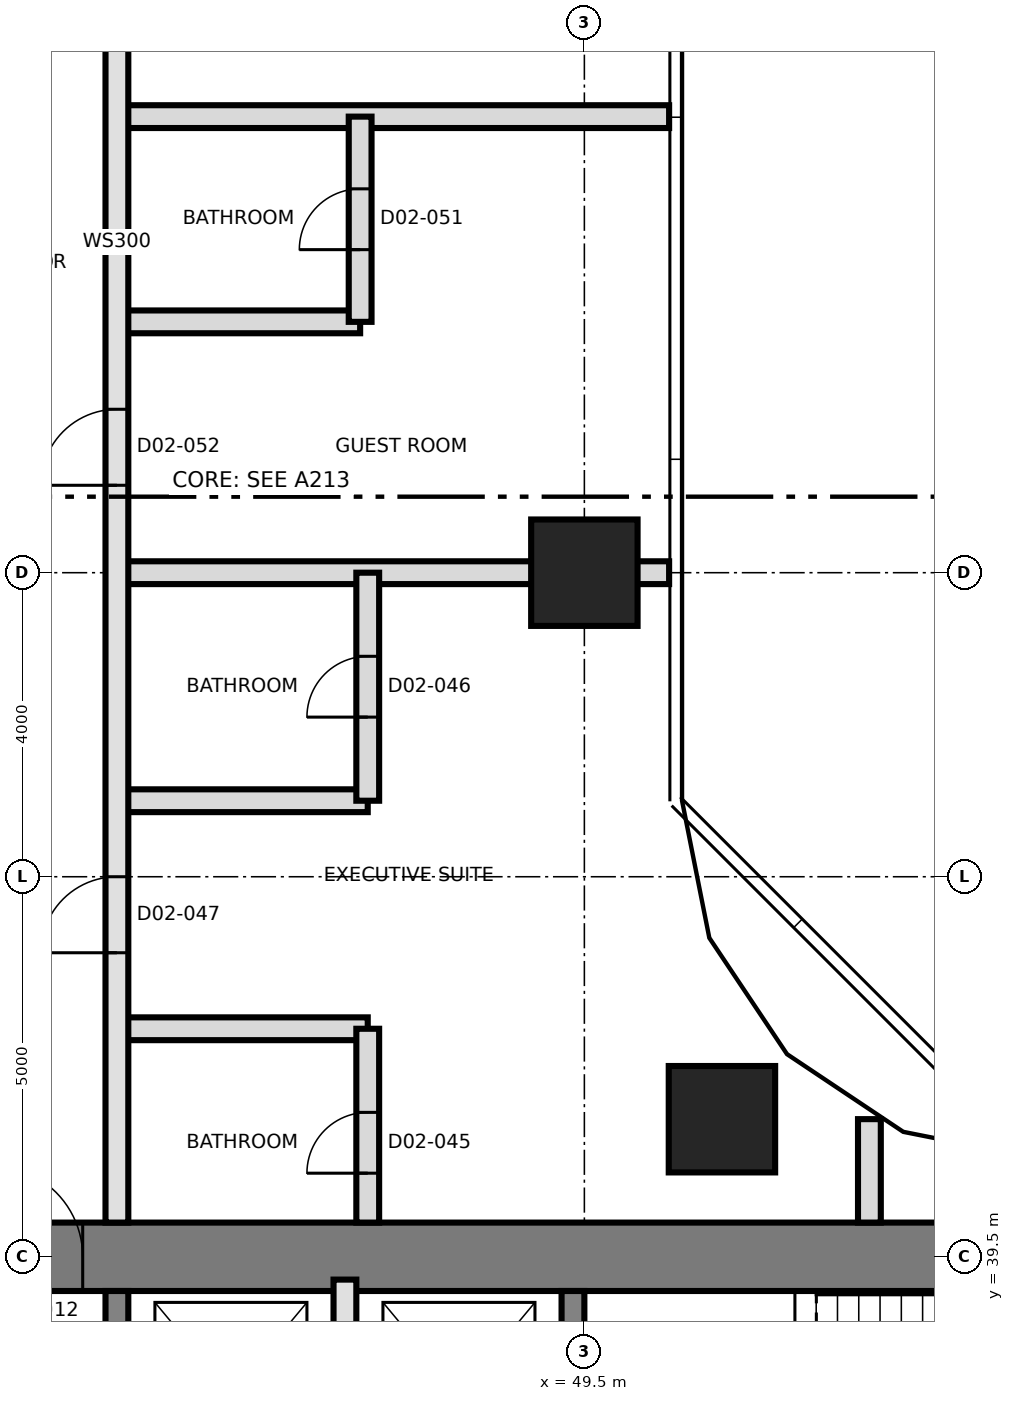
"""IFC4 building model, lengths in metres.
Left out: names, types, materials, properties, quantities, classifications, styles, units other than length and angle.
Written with IfcOpenShell. Run it as: python <this file> out.ifc"""

import sys

from ifc_helpers import new_model, si_unit, direction, frame, frame_2d, origin, origin_2d, place, context, subcontext, project, spatial, rectangle, extrude, element, fill, save


model = new_model("IFC4")
c1 = context("Model", 3, precision=1e-05, world=origin(), true_north=direction((0.0, 1.0)))
c2 = subcontext(c1, "Body", "Model", "MODEL_VIEW")
j1 = project(units=[si_unit("LENGTHUNIT", "METRE"), si_unit("PLANEANGLEUNIT", "RADIAN")], contexts=[c1])
p1 = place(None, origin())
s1 = spatial("IfcSite", under=j1, at=p1, CompositionType="ELEMENT")
p2 = place(p1, origin())
s2 = spatial("IfcBuilding", under=s1, at=p2, CompositionType="ELEMENT")
p3 = place(p2, frame((0.0, 0.0, 48.3)))
s3 = spatial("IfcBuildingStorey", under=s2, at=p3, CompositionType="ELEMENT", Elevation=48.3)
p4 = place(p3, frame((31.05, 39.5, 0.0), z_axis=(0.0, 0.0, 1.0), x_axis=(1.0, 0.0, 0.0)))
e1 = element("IfcWall", 1, at=p4, inside=s3, PredefinedType="SHEAR", context=c2, shape_type="SweptSolid", body=[
    extrude(rectangle(XDim=27.0, YDim=0.9, at=frame_2d((13.5, 0.0))), origin(), (0.0, 0.0, 1.0), 3.7),
])
p5 = place(p4, frame((10.65, 0.0, 0.0)))
e2 = element("IfcOpeningElement", 2, at=p5, cuts=e1, PredefinedType="OPENING", context=c2, shape_type="SweptSolid", body=[
    extrude(rectangle(XDim=1.2, YDim=2.1, at=frame_2d((0.6, 1.05))), frame((0.0, 0.46, 0.0), z_axis=(0.0, -1.0, 0.0), x_axis=(1.0, 0.0, 0.0)), (0.0, 0.0, 1.0), 0.92),
])
for number, where, z_axis, x_axis in (
    (3, (43.35, 33.5, 0.0), (0.0, 0.0, 1.0), (0.0, 1.0, 0.0)),
    (4, (49.35, 33.5, 0.0), (0.0, 0.0, 1.0), (0.0, 1.0, 0.0)),
):
    element("IfcWall", number, at=place(p3, frame(where, z_axis=z_axis, x_axis=x_axis)), inside=s3, PredefinedType="SHEAR", context=c2, shape_type="SweptSolid", body=[
        extrude(rectangle(XDim=5.55, YDim=0.3, at=frame_2d((2.775, 0.0))), origin(), (0.0, 0.0, 1.0), 3.7),
    ])
for number, where, z_axis, x_axis in (
    (5, (51.31, 41.31, 0.0), (0.0, 0.0, 1.0), (1.0, 0.0, 0.0)),
    (6, (49.5, 48.5, 0.0), (0.0, 0.0, 1.0), (1.0, 0.0, 0.0)),
):
    element("IfcColumn", number, at=place(p3, frame(where, z_axis=z_axis, x_axis=x_axis)), inside=s3, PredefinedType="COLUMN", context=c2, shape_type="SweptSolid", body=[
        extrude(rectangle(XDim=1.4, YDim=1.4, at=origin_2d()), origin(), (0.0, 0.0, 1.0), 3.7),
    ])
p6 = place(p3, frame((46.35, 36.2, 0.0), z_axis=(0.0, 0.0, 1.0), x_axis=(0.0, 1.0, 0.0)))
e7 = element("IfcWall", 7, at=p6, inside=s3, PredefinedType="SOLIDWALL", context=c2, shape_type="SweptSolid", body=[
    extrude(rectangle(XDim=3.0, YDim=0.3, at=frame_2d((1.5, 0.0))), origin(), (0.0, 0.0, 1.0), 3.4),
])
for number, where, z_axis, x_axis in (
    (8, (43.35, 42.5, 0.0), (0.0, 0.0, 1.0), (1.0, 0.0, 0.0)),
    (9, (43.35, 45.5, 0.0), (0.0, 0.0, 1.0), (1.0, 0.0, 0.0)),
):
    element("IfcWall", number, at=place(p3, frame(where, z_axis=z_axis, x_axis=x_axis)), inside=s3, PredefinedType="PARTITIONING", context=c2, shape_type="SweptSolid", body=[
        extrude(rectangle(XDim=3.3, YDim=0.3, at=frame_2d((1.65, 0.0))), origin(), (0.0, 0.0, 1.0), 3.4),
    ])
p7 = place(p3, frame((43.35, 48.5, 0.0), z_axis=(0.0, 0.0, 1.0), x_axis=(1.0, 0.0, 0.0)))
e10 = element("IfcWall", 10, at=p7, inside=s3, PredefinedType="PARTITIONING", context=c2, shape_type="SweptSolid", body=[
    extrude(rectangle(XDim=7.265, YDim=0.3, at=frame_2d((3.632, 0.0))), origin(), (0.0, 0.0, 1.0), 3.4),
])
p8 = place(p3, frame((43.35, 51.8, 0.0), z_axis=(0.0, 0.0, 1.0), x_axis=(1.0, 0.0, 0.0)))
e11 = element("IfcWall", 11, at=p8, inside=s3, PredefinedType="PARTITIONING", context=c2, shape_type="SweptSolid", body=[
    extrude(rectangle(XDim=3.2, YDim=0.3, at=frame_2d((1.6, 0.0))), origin(), (0.0, 0.0, 1.0), 3.4),
])
p9 = place(p3, frame((43.35, 54.5, 0.0), z_axis=(0.0, 0.0, 1.0), x_axis=(1.0, 0.0, 0.0)))
e12 = element("IfcWall", 12, at=p9, inside=s3, PredefinedType="PARTITIONING", context=c2, shape_type="SweptSolid", body=[
    extrude(rectangle(XDim=7.265, YDim=0.3, at=frame_2d((3.632, 0.0))), origin(), (0.0, 0.0, 1.0), 3.4),
])
p10 = place(p3, frame((43.35, 39.95, 0.0), z_axis=(0.0, 0.0, 1.0), x_axis=(0.0, 1.0, 0.0)))
e13 = element("IfcWall", 13, at=p10, inside=s3, PredefinedType="SOLIDWALL", context=c2, shape_type="SweptSolid", body=[
    extrude(rectangle(XDim=25.8, YDim=0.3, at=frame_2d((12.9, 0.0))), origin(), (0.0, 0.0, 1.0), 3.4),
])
p11 = place(p10, frame((3.55, 0.0, 0.0)))
e14 = element("IfcOpeningElement", 14, at=p11, cuts=e13, PredefinedType="OPENING", context=c2, shape_type="SweptSolid", body=[
    extrude(rectangle(XDim=1.0, YDim=2.4, at=frame_2d((0.5, 1.2))), frame((0.0, 0.16, 0.0), z_axis=(0.0, -1.0, 0.0), x_axis=(1.0, 0.0, 0.0)), (0.0, 0.0, 1.0), 0.32),
])
p12 = place(p10, frame((9.7, 0.0, 0.0)))
e15 = element("IfcOpeningElement", 15, at=p12, cuts=e13, PredefinedType="OPENING", context=c2, shape_type="SweptSolid", body=[
    extrude(rectangle(XDim=1.0, YDim=2.1, at=frame_2d((0.5, 1.05))), frame((0.0, 0.16, 0.0), z_axis=(0.0, -1.0, 0.0), x_axis=(1.0, 0.0, 0.0)), (0.0, 0.0, 1.0), 0.32),
])
p13 = place(p10, frame((15.55, 0.0, 0.0)))
e16 = element("IfcOpeningElement", 16, at=p13, cuts=e13, PredefinedType="OPENING", context=c2, shape_type="SweptSolid", body=[
    extrude(rectangle(XDim=1.0, YDim=2.1, at=frame_2d((0.5, 1.05))), frame((0.0, 0.16, 0.0), z_axis=(0.0, -1.0, 0.0), x_axis=(1.0, 0.0, 0.0)), (0.0, 0.0, 1.0), 0.32),
])
p14 = place(p10, frame((19.55, 0.0, 0.0)))
e17 = element("IfcOpeningElement", 17, at=p14, cuts=e13, PredefinedType="OPENING", context=c2, shape_type="SweptSolid", body=[
    extrude(rectangle(XDim=1.0, YDim=2.4, at=frame_2d((0.5, 1.2))), frame((0.0, 0.16, 0.0), z_axis=(0.0, -1.0, 0.0), x_axis=(1.0, 0.0, 0.0)), (0.0, 0.0, 1.0), 0.32),
])
p15 = place(p3, frame((46.55, 51.8, 0.0), z_axis=(0.0, 0.0, 1.0), x_axis=(0.0, 1.0, 0.0)))
e18 = element("IfcWall", 18, at=p15, inside=s3, PredefinedType="PARTITIONING", context=c2, shape_type="SweptSolid", body=[
    extrude(rectangle(XDim=2.7, YDim=0.3, at=frame_2d((1.35, 0.0))), origin(), (0.0, 0.0, 1.0), 3.4),
])
p16 = place(p15, frame((0.95, 0.0, 0.0)))
e19 = element("IfcOpeningElement", 19, at=p16, cuts=e18, PredefinedType="OPENING", context=c2, shape_type="SweptSolid", body=[
    extrude(rectangle(XDim=0.8, YDim=2.1, at=frame_2d((0.4, 1.05))), frame((0.0, 0.16, 0.0), z_axis=(0.0, -1.0, 0.0), x_axis=(1.0, 0.0, 0.0)), (0.0, 0.0, 1.0), 0.32),
])
p17 = place(p3, frame((46.65, 39.95, 0.0), z_axis=(0.0, 0.0, 1.0), x_axis=(0.0, 1.0, 0.0)))
e20 = element("IfcWall", 20, at=p17, inside=s3, PredefinedType="PARTITIONING", context=c2, shape_type="SweptSolid", body=[
    extrude(rectangle(XDim=2.55, YDim=0.3, at=frame_2d((1.275, 0.0))), origin(), (0.0, 0.0, 1.0), 3.4),
])
p18 = place(p17, frame((0.65, 0.0, 0.0)))
e21 = element("IfcOpeningElement", 21, at=p18, cuts=e20, PredefinedType="OPENING", context=c2, shape_type="SweptSolid", body=[
    extrude(rectangle(XDim=0.8, YDim=2.1, at=frame_2d((0.4, 1.05))), frame((0.0, 0.16, 0.0), z_axis=(0.0, -1.0, 0.0), x_axis=(1.0, 0.0, 0.0)), (0.0, 0.0, 1.0), 0.32),
])
p19 = place(p3, frame((46.65, 45.5, 0.0), z_axis=(0.0, 0.0, 1.0), x_axis=(0.0, 1.0, 0.0)))
e22 = element("IfcWall", 22, at=p19, inside=s3, PredefinedType="PARTITIONING", context=c2, shape_type="SweptSolid", body=[
    extrude(rectangle(XDim=3.0, YDim=0.3, at=frame_2d((1.5, 0.0))), origin(), (0.0, 0.0, 1.0), 3.4),
])
p20 = place(p19, frame((1.1, 0.0, 0.0)))
e23 = element("IfcOpeningElement", 23, at=p20, cuts=e22, PredefinedType="OPENING", context=c2, shape_type="SweptSolid", body=[
    extrude(rectangle(XDim=0.8, YDim=2.1, at=frame_2d((0.4, 1.05))), frame((0.0, 0.16, 0.0), z_axis=(0.0, -1.0, 0.0), x_axis=(1.0, 0.0, 0.0)), (0.0, 0.0, 1.0), 0.32),
])
p21 = place(p3, frame((53.25, 39.95, 0.0), z_axis=(0.0, 0.0, 1.0), x_axis=(0.0, 1.0, 0.0)))
e24 = element("IfcWall", 24, at=p21, inside=s3, PredefinedType="PARTITIONING", context=c2, shape_type="SweptSolid", body=[
    extrude(rectangle(XDim=1.361, YDim=0.3, at=frame_2d((0.681, 0.0))), origin(), (0.0, 0.0, 1.0), 3.4),
])
p22 = place(p5, origin())
e25 = element("IfcDoor", 25, at=p22, inside=s3, OperationType="SINGLE_SWING_RIGHT", PredefinedType="DOOR", context=c2, shape_type="SweptSolid", body=[
    extrude(rectangle(XDim=1.2, YDim=2.1, at=frame_2d((0.6, 1.05))), frame((0.0, 0.025, 0.0), z_axis=(0.0, -1.0, 0.0), x_axis=(1.0, 0.0, 0.0)), (0.0, 0.0, 1.0), 0.05),
])
fill(e2, e25)
p23 = place(p18, origin())
e26 = element("IfcDoor", 26, at=p23, inside=s3, OperationType="SINGLE_SWING_RIGHT", PredefinedType="DOOR", context=c2, shape_type="SweptSolid", body=[
    extrude(rectangle(XDim=0.8, YDim=2.1, at=frame_2d((0.4, 1.05))), frame((0.0, 0.025, 0.0), z_axis=(0.0, -1.0, 0.0), x_axis=(1.0, 0.0, 0.0)), (0.0, 0.0, 1.0), 0.05),
])
fill(e21, e26)
p24 = place(p20, origin())
e27 = element("IfcDoor", 27, at=p24, inside=s3, OperationType="SINGLE_SWING_LEFT", PredefinedType="DOOR", context=c2, shape_type="SweptSolid", body=[
    extrude(rectangle(XDim=0.8, YDim=2.1, at=frame_2d((0.4, 1.05))), frame((0.0, 0.025, 0.0), z_axis=(0.0, -1.0, 0.0), x_axis=(1.0, 0.0, 0.0)), (0.0, 0.0, 1.0), 0.05),
])
fill(e23, e27)
p25 = place(p11, origin())
e28 = element("IfcDoor", 28, at=p25, inside=s3, OperationType="SINGLE_SWING_LEFT", PredefinedType="DOOR", context=c2, shape_type="SweptSolid", body=[
    extrude(rectangle(XDim=1.0, YDim=2.4, at=frame_2d((0.5, 1.2))), frame((0.0, 0.025, 0.0), z_axis=(0.0, -1.0, 0.0), x_axis=(1.0, 0.0, 0.0)), (0.0, 0.0, 1.0), 0.05),
])
fill(e14, e28)
p26 = place(p16, origin())
e29 = element("IfcDoor", 29, at=p26, inside=s3, OperationType="SINGLE_SWING_RIGHT", PredefinedType="DOOR", context=c2, shape_type="SweptSolid", body=[
    extrude(rectangle(XDim=0.8, YDim=2.1, at=frame_2d((0.4, 1.05))), frame((0.0, 0.025, 0.0), z_axis=(0.0, -1.0, 0.0), x_axis=(1.0, 0.0, 0.0)), (0.0, 0.0, 1.0), 0.05),
])
fill(e19, e29)
p27 = place(p12, origin())
e30 = element("IfcDoor", 30, at=p27, inside=s3, OperationType="SINGLE_SWING_LEFT", PredefinedType="DOOR", context=c2, shape_type="SweptSolid", body=[
    extrude(rectangle(XDim=1.0, YDim=2.1, at=frame_2d((0.5, 1.05))), frame((0.0, 0.025, 0.0), z_axis=(0.0, -1.0, 0.0), x_axis=(1.0, 0.0, 0.0)), (0.0, 0.0, 1.0), 0.05),
])
fill(e15, e30)
save(model, sys.argv[1])
